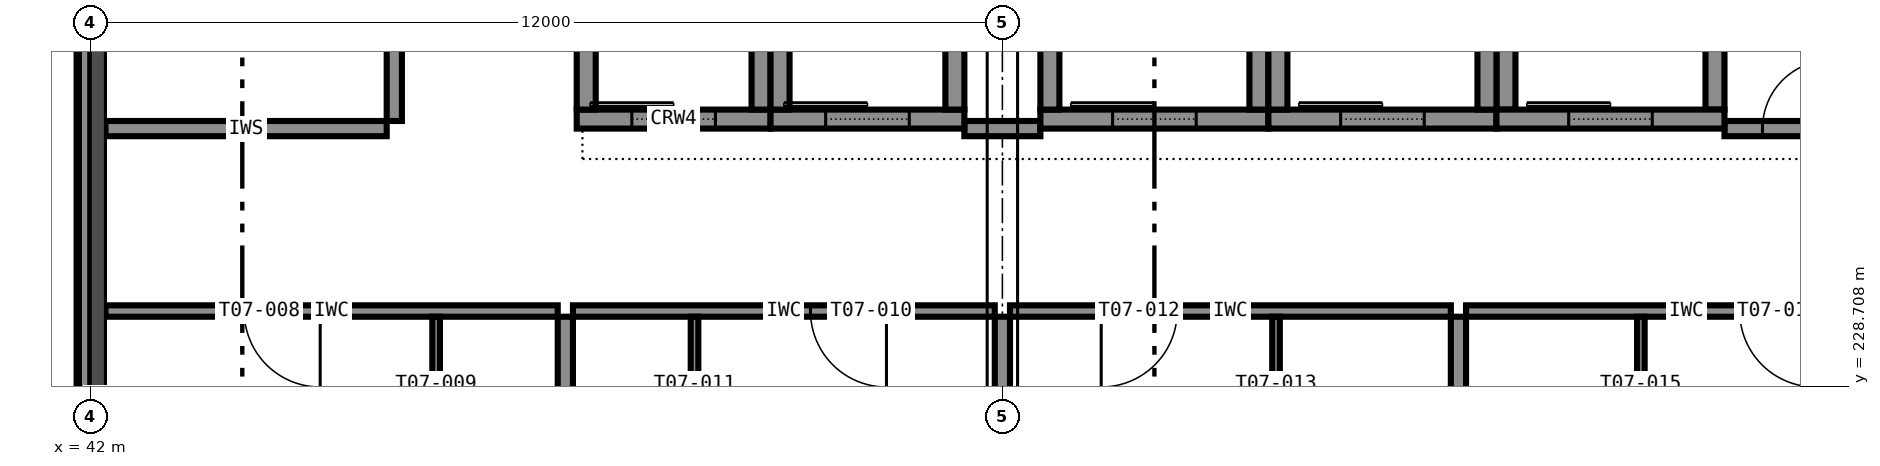
"""IFC4 building model, lengths in metres.
Left out: names, types, materials, properties, quantities, classifications, styles, units other than length and angle.
Written with IfcOpenShell. Run it as: python <this file> out.ifc"""

import sys

from ifc_helpers import new_model, si_unit, direction, frame, frame_2d, origin, place, context, subcontext, project, spatial, rectangle, extrude, element, fill, save


model = new_model("IFC4")
c1 = context("Model", 3, precision=1e-05, world=origin(), true_north=direction((0.0, 1.0)))
c2 = subcontext(c1, "Body", "Model", "MODEL_VIEW")
j1 = project(units=[si_unit("LENGTHUNIT", "METRE"), si_unit("PLANEANGLEUNIT", "RADIAN")], contexts=[c1])
p1 = place(None, origin())
s1 = spatial("IfcSite", under=j1, at=p1, CompositionType="ELEMENT")
p2 = place(p1, origin())
s2 = spatial("IfcBuilding", under=s1, at=p2, CompositionType="ELEMENT")
p3 = place(p2, frame((0.0, 0.0, 31.8)))
s3 = spatial("IfcBuildingStorey", under=s2, at=p3, CompositionType="ELEMENT", Elevation=31.8)
p4 = place(p3, frame((54.5, 232.225, 0.0), z_axis=(0.0, 0.0, 1.0), x_axis=(1.0, 0.0, 0.0)))
e1 = element("IfcWall", 1, at=p4, inside=s3, PredefinedType="SHEAR", context=c2, shape_type="SweptSolid", body=[
    extrude(rectangle(XDim=3.0, YDim=0.25, at=frame_2d((1.5, 0.0))), origin(), (0.0, 0.0, 1.0), 3.6),
])
p5 = place(p4, frame((0.95, 0.0, 0.0)))
e2 = element("IfcOpeningElement", 2, at=p5, cuts=e1, PredefinedType="OPENING", context=c2, shape_type="SweptSolid", body=[
    extrude(rectangle(XDim=1.1, YDim=2.1, at=frame_2d((0.55, 1.05))), frame((0.0, 0.135, 0.0), z_axis=(0.0, -1.0, 0.0), x_axis=(1.0, 0.0, 0.0)), (0.0, 0.0, 1.0), 0.27),
])
for number, where, z_axis, x_axis in (
    (3, (54.625, 232.35, 0.0), (0.0, 0.0, 1.0), (0.0, 1.0, 0.0)),
    (4, (57.375, 232.35, 0.0), (0.0, 0.0, 1.0), (0.0, 1.0, 0.0)),
):
    element("IfcWall", number, at=place(p3, frame(where, z_axis=z_axis, x_axis=x_axis)), inside=s3, PredefinedType="SHEAR", context=c2, shape_type="SweptSolid", body=[
        extrude(rectangle(XDim=3.3, YDim=0.25, at=frame_2d((1.65, 0.0))), origin(), (0.0, 0.0, 1.0), 3.6),
    ])
p6 = place(p3, frame((57.5, 232.225, 0.0), z_axis=(0.0, 0.0, 1.0), x_axis=(1.0, 0.0, 0.0)))
e5 = element("IfcWall", 5, at=p6, inside=s3, PredefinedType="SHEAR", context=c2, shape_type="SweptSolid", body=[
    extrude(rectangle(XDim=3.0, YDim=0.25, at=frame_2d((1.5, 0.0))), origin(), (0.0, 0.0, 1.0), 3.6),
])
p7 = place(p6, frame((0.95, 0.0, 0.0)))
e6 = element("IfcOpeningElement", 6, at=p7, cuts=e5, PredefinedType="OPENING", context=c2, shape_type="SweptSolid", body=[
    extrude(rectangle(XDim=1.1, YDim=2.1, at=frame_2d((0.55, 1.05))), frame((0.0, 0.135, 0.0), z_axis=(0.0, -1.0, 0.0), x_axis=(1.0, 0.0, 0.0)), (0.0, 0.0, 1.0), 0.27),
])
for number, where, z_axis, x_axis in (
    (7, (57.625, 232.35, 0.0), (0.0, 0.0, 1.0), (0.0, 1.0, 0.0)),
    (8, (60.375, 232.35, 0.0), (0.0, 0.0, 1.0), (0.0, 1.0, 0.0)),
):
    element("IfcWall", number, at=place(p3, frame(where, z_axis=z_axis, x_axis=x_axis)), inside=s3, PredefinedType="SHEAR", context=c2, shape_type="SweptSolid", body=[
        extrude(rectangle(XDim=3.3, YDim=0.25, at=frame_2d((1.65, 0.0))), origin(), (0.0, 0.0, 1.0), 3.6),
    ])
p8 = place(p3, frame((60.5, 232.225, 0.0), z_axis=(0.0, 0.0, 1.0), x_axis=(1.0, 0.0, 0.0)))
e9 = element("IfcWall", 9, at=p8, inside=s3, PredefinedType="SHEAR", context=c2, shape_type="SweptSolid", body=[
    extrude(rectangle(XDim=3.0, YDim=0.25, at=frame_2d((1.5, 0.0))), origin(), (0.0, 0.0, 1.0), 3.6),
])
p9 = place(p8, frame((0.95, 0.0, 0.0)))
e10 = element("IfcOpeningElement", 10, at=p9, cuts=e9, PredefinedType="OPENING", context=c2, shape_type="SweptSolid", body=[
    extrude(rectangle(XDim=1.1, YDim=2.1, at=frame_2d((0.55, 1.05))), frame((0.0, 0.135, 0.0), z_axis=(0.0, -1.0, 0.0), x_axis=(1.0, 0.0, 0.0)), (0.0, 0.0, 1.0), 0.27),
])
for number, where, z_axis, x_axis in (
    (11, (60.625, 232.35, 0.0), (0.0, 0.0, 1.0), (0.0, 1.0, 0.0)),
    (12, (63.375, 232.35, 0.0), (0.0, 0.0, 1.0), (0.0, 1.0, 0.0)),
):
    element("IfcWall", number, at=place(p3, frame(where, z_axis=z_axis, x_axis=x_axis)), inside=s3, PredefinedType="SHEAR", context=c2, shape_type="SweptSolid", body=[
        extrude(rectangle(XDim=3.3, YDim=0.25, at=frame_2d((1.65, 0.0))), origin(), (0.0, 0.0, 1.0), 3.6),
    ])
p10 = place(p3, frame((48.4, 232.225, 0.0), z_axis=(0.0, 0.0, 1.0), x_axis=(1.0, 0.0, 0.0)))
e13 = element("IfcWall", 13, at=p10, inside=s3, PredefinedType="SHEAR", context=c2, shape_type="SweptSolid", body=[
    extrude(rectangle(XDim=2.55, YDim=0.25, at=frame_2d((1.275, 0.0))), origin(), (0.0, 0.0, 1.0), 3.6),
])
p11 = place(p10, frame((0.725, 0.0, 0.0)))
e14 = element("IfcOpeningElement", 14, at=p11, cuts=e13, PredefinedType="OPENING", context=c2, shape_type="SweptSolid", body=[
    extrude(rectangle(XDim=1.1, YDim=2.1, at=frame_2d((0.55, 1.05))), frame((0.0, 0.135, 0.0), z_axis=(0.0, -1.0, 0.0), x_axis=(1.0, 0.0, 0.0)), (0.0, 0.0, 1.0), 0.27),
])
for number, where, z_axis, x_axis in (
    (15, (48.525, 232.35, 0.0), (0.0, 0.0, 1.0), (0.0, 1.0, 0.0)),
    (16, (50.825, 232.35, 0.0), (0.0, 0.0, 1.0), (0.0, 1.0, 0.0)),
):
    element("IfcWall", number, at=place(p3, frame(where, z_axis=z_axis, x_axis=x_axis)), inside=s3, PredefinedType="SHEAR", context=c2, shape_type="SweptSolid", body=[
        extrude(rectangle(XDim=3.3, YDim=0.25, at=frame_2d((1.65, 0.0))), origin(), (0.0, 0.0, 1.0), 3.6),
    ])
p12 = place(p3, frame((50.95, 232.225, 0.0), z_axis=(0.0, 0.0, 1.0), x_axis=(1.0, 0.0, 0.0)))
e17 = element("IfcWall", 17, at=p12, inside=s3, PredefinedType="SHEAR", context=c2, shape_type="SweptSolid", body=[
    extrude(rectangle(XDim=2.55, YDim=0.25, at=frame_2d((1.275, 0.0))), origin(), (0.0, 0.0, 1.0), 3.6),
])
p13 = place(p12, frame((0.725, 0.0, 0.0)))
e18 = element("IfcOpeningElement", 18, at=p13, cuts=e17, PredefinedType="OPENING", context=c2, shape_type="SweptSolid", body=[
    extrude(rectangle(XDim=1.1, YDim=2.1, at=frame_2d((0.55, 1.05))), frame((0.0, 0.135, 0.0), z_axis=(0.0, -1.0, 0.0), x_axis=(1.0, 0.0, 0.0)), (0.0, 0.0, 1.0), 0.27),
])
for number, where, z_axis, x_axis in (
    (19, (51.075, 232.35, 0.0), (0.0, 0.0, 1.0), (0.0, 1.0, 0.0)),
    (20, (53.375, 232.35, 0.0), (0.0, 0.0, 1.0), (0.0, 1.0, 0.0)),
):
    element("IfcWall", number, at=place(p3, frame(where, z_axis=z_axis, x_axis=x_axis)), inside=s3, PredefinedType="SHEAR", context=c2, shape_type="SweptSolid", body=[
        extrude(rectangle(XDim=3.3, YDim=0.25, at=frame_2d((1.65, 0.0))), origin(), (0.0, 0.0, 1.0), 3.6),
    ])
p14 = place(p3, frame((41.925, 233.55, 3.4), z_axis=(0.0, 0.0, 1.0), x_axis=(0.0, -1.0, 0.0)))
e21 = element("IfcWall", 21, at=p14, inside=s3, PredefinedType="STANDARD", context=c2, shape_type="SweptSolid", body=[
    extrude(rectangle(XDim=11.1, YDim=0.15, at=frame_2d((5.55, 0.0))), origin(), (0.0, 0.0, 1.0), 0.2),
])
p15 = place(p3, frame((42.2, 232.1, 0.0), z_axis=(0.0, 0.0, 1.0), x_axis=(1.0, 0.0, 0.0)))
e22 = element("IfcWall", 22, at=p15, inside=s3, PredefinedType="PARTITIONING", context=c2, shape_type="SweptSolid", body=[
    extrude(rectangle(XDim=3.7, YDim=0.2, at=frame_2d((1.85, 0.0))), origin(), (0.0, 0.0, 1.0), 3.4),
])
p16 = place(p3, frame((53.5, 232.1, 0.0), z_axis=(0.0, 0.0, 1.0), x_axis=(1.0, 0.0, 0.0)))
e23 = element("IfcWall", 23, at=p16, inside=s3, PredefinedType="PARTITIONING", context=c2, shape_type="SweptSolid", body=[
    extrude(rectangle(XDim=1.0, YDim=0.2, at=frame_2d((0.5, 0.0))), origin(), (0.0, 0.0, 1.0), 3.4),
])
p17 = place(p3, frame((63.5, 232.1, 0.0), z_axis=(0.0, 0.0, 1.0), x_axis=(1.0, 0.0, 0.0)))
e24 = element("IfcWall", 24, at=p17, inside=s3, PredefinedType="PARTITIONING", context=c2, shape_type="SweptSolid", body=[
    extrude(rectangle(XDim=1.9, YDim=0.2, at=frame_2d((0.95, 0.0))), origin(), (0.0, 0.0, 1.0), 3.4),
])
p18 = place(p17, frame((0.5, 0.0, 0.0)))
e25 = element("IfcOpeningElement", 25, at=p18, cuts=e24, PredefinedType="OPENING", context=c2, shape_type="SweptSolid", body=[
    extrude(rectangle(XDim=0.9, YDim=2.1, at=frame_2d((0.45, 1.05))), frame((0.0, 0.11, 0.0), z_axis=(0.0, -1.0, 0.0), x_axis=(1.0, 0.0, 0.0)), (0.0, 0.0, 1.0), 0.22),
])
p19 = place(p3, frame((46.0, 232.2, 0.0), z_axis=(0.0, 0.0, 1.0), x_axis=(0.0, 1.0, 0.0)))
e26 = element("IfcWall", 26, at=p19, inside=s3, PredefinedType="PARTITIONING", context=c2, shape_type="SweptSolid", body=[
    extrude(rectangle(XDim=3.6, YDim=0.2, at=frame_2d((1.8, 0.0))), origin(), (0.0, 0.0, 1.0), 3.4),
])
p20 = place(p19, frame((1.35, 0.0, 0.0)))
e27 = element("IfcOpeningElement", 27, at=p20, cuts=e26, PredefinedType="OPENING", context=c2, shape_type="SweptSolid", body=[
    extrude(rectangle(XDim=0.9, YDim=2.1, at=frame_2d((0.45, 1.05))), frame((0.0, 0.11, 0.0), z_axis=(0.0, -1.0, 0.0), x_axis=(1.0, 0.0, 0.0)), (0.0, 0.0, 1.0), 0.22),
])
p21 = place(p3, frame((48.15, 229.7, 0.0), z_axis=(0.0, 0.0, 1.0), x_axis=(-1.0, 0.0, 0.0)))
e28 = element("IfcWall", 28, at=p21, inside=s3, PredefinedType="PARTITIONING", context=c2, shape_type="SweptSolid", body=[
    extrude(rectangle(XDim=5.95, YDim=0.15, at=frame_2d((2.975, 0.0))), origin(), (0.0, 0.0, 1.0), 3.4),
])
p22 = place(p21, frame((3.125, 0.0, 0.0)))
e29 = element("IfcOpeningElement", 29, at=p22, cuts=e28, PredefinedType="OPENING", context=c2, shape_type="SweptSolid", body=[
    extrude(rectangle(XDim=1.0, YDim=2.1, at=frame_2d((0.5, 1.05))), frame((0.0, 0.085, 0.0), z_axis=(0.0, -1.0, 0.0), x_axis=(1.0, 0.0, 0.0)), (0.0, 0.0, 1.0), 0.17),
])
p23 = place(p3, frame((46.55, 226.75, 0.0), z_axis=(0.0, 0.0, 1.0), x_axis=(0.0, 1.0, 0.0)))
e30 = element("IfcWall", 30, at=p23, inside=s3, PredefinedType="PARTITIONING", context=c2, shape_type="SweptSolid", body=[
    extrude(rectangle(XDim=2.875, YDim=0.1, at=frame_2d((1.438, 0.0))), origin(), (0.0, 0.0, 1.0), 3.4),
])
p24 = place(p23, frame((1.038, 0.0, 0.0)))
e31 = element("IfcOpeningElement", 31, at=p24, cuts=e30, PredefinedType="OPENING", context=c2, shape_type="SweptSolid", body=[
    extrude(rectangle(XDim=0.8, YDim=2.1, at=frame_2d((0.4, 1.05))), frame((0.0, 0.06, 0.0), z_axis=(0.0, -1.0, 0.0), x_axis=(1.0, 0.0, 0.0)), (0.0, 0.0, 1.0), 0.12),
])
p25 = place(p3, frame((53.9, 229.7, 0.0), z_axis=(0.0, 0.0, 1.0), x_axis=(-1.0, 0.0, 0.0)))
e32 = element("IfcWall", 32, at=p25, inside=s3, PredefinedType="PARTITIONING", context=c2, shape_type="SweptSolid", body=[
    extrude(rectangle(XDim=5.55, YDim=0.15, at=frame_2d((2.775, 0.0))), origin(), (0.0, 0.0, 1.0), 3.4),
])
p26 = place(p25, frame((1.425, 0.0, 0.0)))
e33 = element("IfcOpeningElement", 33, at=p26, cuts=e32, PredefinedType="OPENING", context=c2, shape_type="SweptSolid", body=[
    extrude(rectangle(XDim=1.0, YDim=2.1, at=frame_2d((0.5, 1.05))), frame((0.0, 0.085, 0.0), z_axis=(0.0, -1.0, 0.0), x_axis=(1.0, 0.0, 0.0)), (0.0, 0.0, 1.0), 0.17),
])
p27 = place(p3, frame((49.95, 229.625, 0.0), z_axis=(0.0, 0.0, 1.0), x_axis=(0.0, -1.0, 0.0)))
e34 = element("IfcWall", 34, at=p27, inside=s3, PredefinedType="PARTITIONING", context=c2, shape_type="SweptSolid", body=[
    extrude(rectangle(XDim=2.875, YDim=0.1, at=frame_2d((1.438, 0.0))), origin(), (0.0, 0.0, 1.0), 3.4),
])
p28 = place(p27, frame((1.038, 0.0, 0.0)))
e35 = element("IfcOpeningElement", 35, at=p28, cuts=e34, PredefinedType="OPENING", context=c2, shape_type="SweptSolid", body=[
    extrude(rectangle(XDim=0.8, YDim=2.1, at=frame_2d((0.4, 1.05))), frame((0.0, 0.06, 0.0), z_axis=(0.0, -1.0, 0.0), x_axis=(1.0, 0.0, 0.0)), (0.0, 0.0, 1.0), 0.12),
])
p29 = place(p3, frame((59.9, 229.7, 0.0), z_axis=(0.0, 0.0, 1.0), x_axis=(-1.0, 0.0, 0.0)))
e36 = element("IfcWall", 36, at=p29, inside=s3, PredefinedType="PARTITIONING", context=c2, shape_type="SweptSolid", body=[
    extrude(rectangle(XDim=5.8, YDim=0.15, at=frame_2d((2.9, 0.0))), origin(), (0.0, 0.0, 1.0), 3.4),
])
p30 = place(p29, frame((3.6, 0.0, 0.0)))
e37 = element("IfcOpeningElement", 37, at=p30, cuts=e36, PredefinedType="OPENING", context=c2, shape_type="SweptSolid", body=[
    extrude(rectangle(XDim=1.0, YDim=2.1, at=frame_2d((0.5, 1.05))), frame((0.0, 0.085, 0.0), z_axis=(0.0, -1.0, 0.0), x_axis=(1.0, 0.0, 0.0)), (0.0, 0.0, 1.0), 0.17),
])
p31 = place(p3, frame((57.6, 226.75, 0.0), z_axis=(0.0, 0.0, 1.0), x_axis=(0.0, 1.0, 0.0)))
e38 = element("IfcWall", 38, at=p31, inside=s3, PredefinedType="PARTITIONING", context=c2, shape_type="SweptSolid", body=[
    extrude(rectangle(XDim=2.875, YDim=0.1, at=frame_2d((1.438, 0.0))), origin(), (0.0, 0.0, 1.0), 3.4),
])
p32 = place(p31, frame((1.038, 0.0, 0.0)))
e39 = element("IfcOpeningElement", 39, at=p32, cuts=e38, PredefinedType="OPENING", context=c2, shape_type="SweptSolid", body=[
    extrude(rectangle(XDim=0.8, YDim=2.1, at=frame_2d((0.4, 1.05))), frame((0.0, 0.06, 0.0), z_axis=(0.0, -1.0, 0.0), x_axis=(1.0, 0.0, 0.0)), (0.0, 0.0, 1.0), 0.12),
])
p33 = place(p3, frame((65.9, 229.7, 0.0), z_axis=(0.0, 0.0, 1.0), x_axis=(-1.0, 0.0, 0.0)))
e40 = element("IfcWall", 40, at=p33, inside=s3, PredefinedType="PARTITIONING", context=c2, shape_type="SweptSolid", body=[
    extrude(rectangle(XDim=5.8, YDim=0.15, at=frame_2d((2.9, 0.0))), origin(), (0.0, 0.0, 1.0), 3.4),
])
p34 = place(p33, frame((1.2, 0.0, 0.0)))
e41 = element("IfcOpeningElement", 41, at=p34, cuts=e40, PredefinedType="OPENING", context=c2, shape_type="SweptSolid", body=[
    extrude(rectangle(XDim=1.0, YDim=2.1, at=frame_2d((0.5, 1.05))), frame((0.0, 0.085, 0.0), z_axis=(0.0, -1.0, 0.0), x_axis=(1.0, 0.0, 0.0)), (0.0, 0.0, 1.0), 0.17),
])
p35 = place(p3, frame((62.4, 229.625, 0.0), z_axis=(0.0, 0.0, 1.0), x_axis=(0.0, -1.0, 0.0)))
e42 = element("IfcWall", 42, at=p35, inside=s3, PredefinedType="PARTITIONING", context=c2, shape_type="SweptSolid", body=[
    extrude(rectangle(XDim=2.875, YDim=0.1, at=frame_2d((1.438, 0.0))), origin(), (0.0, 0.0, 1.0), 3.4),
])
p36 = place(p35, frame((1.038, 0.0, 0.0)))
e43 = element("IfcOpeningElement", 43, at=p36, cuts=e42, PredefinedType="OPENING", context=c2, shape_type="SweptSolid", body=[
    extrude(rectangle(XDim=0.8, YDim=2.1, at=frame_2d((0.4, 1.05))), frame((0.0, 0.06, 0.0), z_axis=(0.0, -1.0, 0.0), x_axis=(1.0, 0.0, 0.0)), (0.0, 0.0, 1.0), 0.12),
])
p37 = place(p3, frame((48.25, 222.3, 0.0), z_axis=(0.0, 0.0, 1.0), x_axis=(0.0, 1.0, 0.0)))
e44 = element("IfcWall", 44, at=p37, inside=s3, PredefinedType="PARTITIONING", context=c2, shape_type="SweptSolid", body=[
    extrude(rectangle(XDim=7.325, YDim=0.2, at=frame_2d((3.663, 0.0))), origin(), (0.0, 0.0, 1.0), 3.4),
])
p38 = place(p3, frame((54.0, 222.45, 0.0), z_axis=(0.0, 0.0, 1.0), x_axis=(0.0, 1.0, 0.0)))
e45 = element("IfcWall", 45, at=p38, inside=s3, PredefinedType="PARTITIONING", context=c2, shape_type="SweptSolid", body=[
    extrude(rectangle(XDim=7.175, YDim=0.2, at=frame_2d((3.587, 0.0))), origin(), (0.0, 0.0, 1.0), 2.6),
])
p39 = place(p3, frame((60.0, 222.3, 0.0), z_axis=(0.0, 0.0, 1.0), x_axis=(0.0, 1.0, 0.0)))
e46 = element("IfcWall", 46, at=p39, inside=s3, PredefinedType="PARTITIONING", context=c2, shape_type="SweptSolid", body=[
    extrude(rectangle(XDim=7.325, YDim=0.2, at=frame_2d((3.663, 0.0))), origin(), (0.0, 0.0, 1.0), 3.4),
])
p40 = place(p18, origin())
e47 = element("IfcDoor", 47, at=p40, inside=s3, OperationType="SINGLE_SWING_RIGHT", PredefinedType="DOOR", context=c2, shape_type="SweptSolid", body=[
    extrude(rectangle(XDim=0.9, YDim=2.1, at=frame_2d((0.45, 1.05))), frame((0.0, 0.025, 0.0), z_axis=(0.0, -1.0, 0.0), x_axis=(1.0, 0.0, 0.0)), (0.0, 0.0, 1.0), 0.05),
])
fill(e25, e47)
p41 = place(p22, origin())
e48 = element("IfcDoor", 48, at=p41, inside=s3, OperationType="SINGLE_SWING_LEFT", PredefinedType="DOOR", context=c2, shape_type="SweptSolid", body=[
    extrude(rectangle(XDim=1.0, YDim=2.1, at=frame_2d((0.5, 1.05))), frame((0.0, 0.025, 0.0), z_axis=(0.0, -1.0, 0.0), x_axis=(1.0, 0.0, 0.0)), (0.0, 0.0, 1.0), 0.05),
])
fill(e29, e48)
p42 = place(p26, origin())
e49 = element("IfcDoor", 49, at=p42, inside=s3, OperationType="SINGLE_SWING_LEFT", PredefinedType="DOOR", context=c2, shape_type="SweptSolid", body=[
    extrude(rectangle(XDim=1.0, YDim=2.1, at=frame_2d((0.5, 1.05))), frame((0.0, 0.025, 0.0), z_axis=(0.0, -1.0, 0.0), x_axis=(1.0, 0.0, 0.0)), (0.0, 0.0, 1.0), 0.05),
])
fill(e33, e49)
p43 = place(p30, origin())
e50 = element("IfcDoor", 50, at=p43, inside=s3, OperationType="SINGLE_SWING_RIGHT", PredefinedType="DOOR", context=c2, shape_type="SweptSolid", body=[
    extrude(rectangle(XDim=1.0, YDim=2.1, at=frame_2d((0.5, 1.05))), frame((0.0, 0.025, 0.0), z_axis=(0.0, -1.0, 0.0), x_axis=(1.0, 0.0, 0.0)), (0.0, 0.0, 1.0), 0.05),
])
fill(e37, e50)
p44 = place(p34, origin())
e51 = element("IfcDoor", 51, at=p44, inside=s3, OperationType="SINGLE_SWING_LEFT", PredefinedType="DOOR", context=c2, shape_type="SweptSolid", body=[
    extrude(rectangle(XDim=1.0, YDim=2.1, at=frame_2d((0.5, 1.05))), frame((0.0, 0.025, 0.0), z_axis=(0.0, -1.0, 0.0), x_axis=(1.0, 0.0, 0.0)), (0.0, 0.0, 1.0), 0.05),
])
fill(e41, e51)
p45 = place(p5, origin())
e52 = element("IfcDoor", 52, at=p45, inside=s3, OperationType="SLIDING_TO_LEFT", PredefinedType="DOOR", context=c2, shape_type="SweptSolid", body=[
    extrude(rectangle(XDim=1.1, YDim=2.1, at=frame_2d((0.55, 1.05))), frame((0.0, 0.025, 0.0), z_axis=(0.0, -1.0, 0.0), x_axis=(1.0, 0.0, 0.0)), (0.0, 0.0, 1.0), 0.05),
])
fill(e2, e52)
p46 = place(p7, origin())
e53 = element("IfcDoor", 53, at=p46, inside=s3, OperationType="SLIDING_TO_LEFT", PredefinedType="DOOR", context=c2, shape_type="SweptSolid", body=[
    extrude(rectangle(XDim=1.1, YDim=2.1, at=frame_2d((0.55, 1.05))), frame((0.0, 0.025, 0.0), z_axis=(0.0, -1.0, 0.0), x_axis=(1.0, 0.0, 0.0)), (0.0, 0.0, 1.0), 0.05),
])
fill(e6, e53)
p47 = place(p9, origin())
e54 = element("IfcDoor", 54, at=p47, inside=s3, OperationType="SLIDING_TO_LEFT", PredefinedType="DOOR", context=c2, shape_type="SweptSolid", body=[
    extrude(rectangle(XDim=1.1, YDim=2.1, at=frame_2d((0.55, 1.05))), frame((0.0, 0.025, 0.0), z_axis=(0.0, -1.0, 0.0), x_axis=(1.0, 0.0, 0.0)), (0.0, 0.0, 1.0), 0.05),
])
fill(e10, e54)
p48 = place(p11, origin())
e55 = element("IfcDoor", 55, at=p48, inside=s3, OperationType="SLIDING_TO_LEFT", PredefinedType="DOOR", context=c2, shape_type="SweptSolid", body=[
    extrude(rectangle(XDim=1.1, YDim=2.1, at=frame_2d((0.55, 1.05))), frame((0.0, 0.025, 0.0), z_axis=(0.0, -1.0, 0.0), x_axis=(1.0, 0.0, 0.0)), (0.0, 0.0, 1.0), 0.05),
])
fill(e14, e55)
p49 = place(p13, origin())
e56 = element("IfcDoor", 56, at=p49, inside=s3, OperationType="SLIDING_TO_LEFT", PredefinedType="DOOR", context=c2, shape_type="SweptSolid", body=[
    extrude(rectangle(XDim=1.1, YDim=2.1, at=frame_2d((0.55, 1.05))), frame((0.0, 0.025, 0.0), z_axis=(0.0, -1.0, 0.0), x_axis=(1.0, 0.0, 0.0)), (0.0, 0.0, 1.0), 0.05),
])
fill(e18, e56)
save(model, sys.argv[1])
